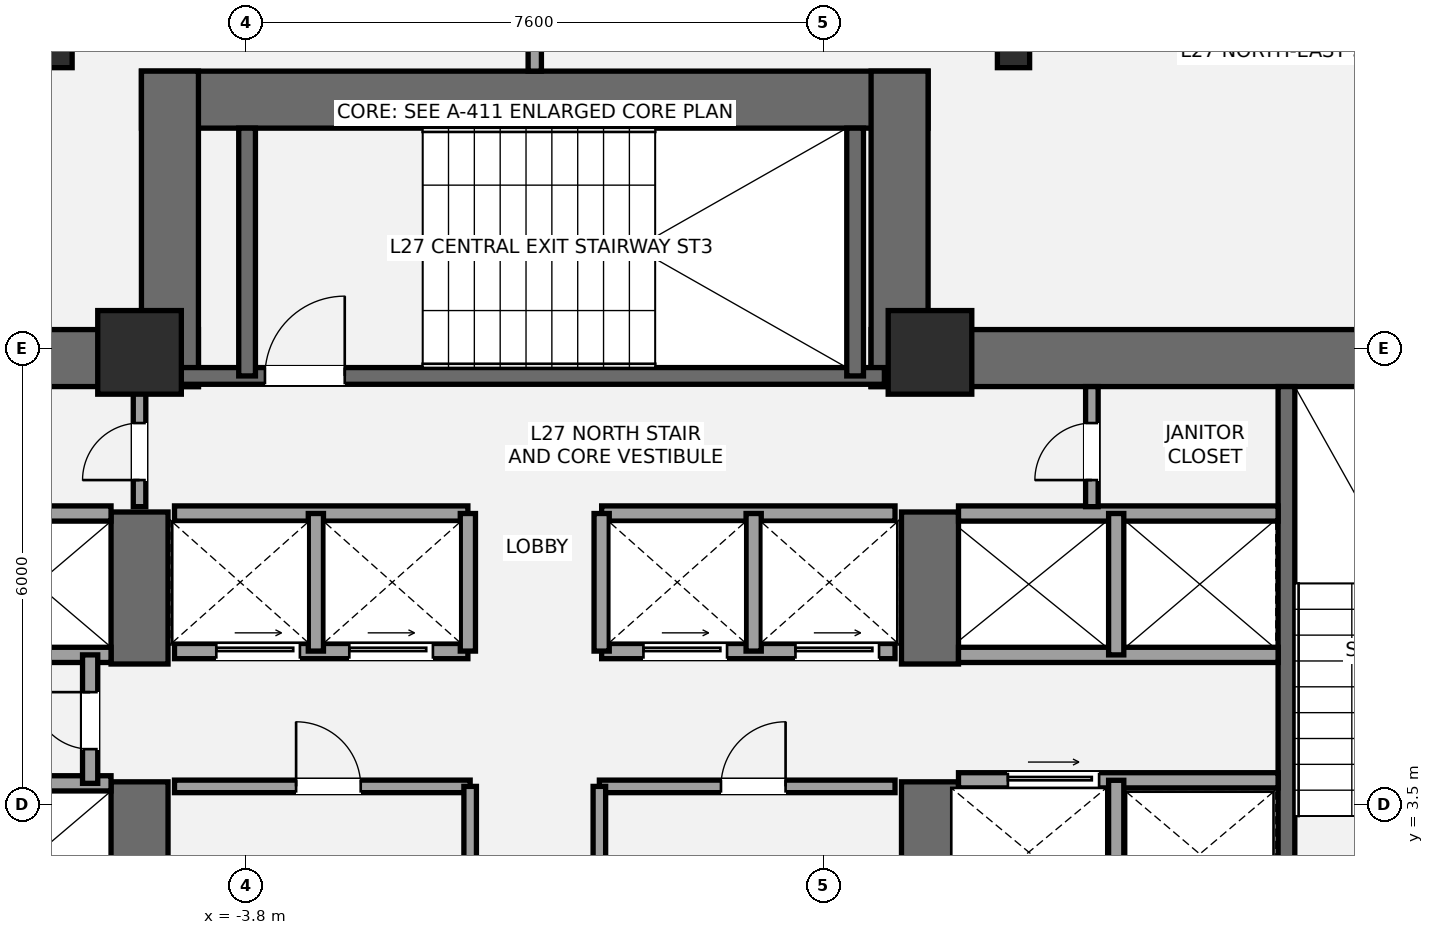
"""IFC4 building model, lengths in metres.
Left out: names, types, materials, properties, quantities, classifications, styles, units other than length and angle.
Written with IfcOpenShell. Run it as: python <this file> out.ifc"""

import sys

from ifc_helpers import new_model, si_unit, direction, frame, frame_2d, origin, origin_2d, place, context, subcontext, project, spatial, rectangle, i_section, extrude, element, fill, save


model = new_model("IFC4")
c1 = context("Model", 3, precision=1e-05, world=origin(), true_north=direction((0.0, 1.0)))
c2 = subcontext(c1, "Body", "Model", "MODEL_VIEW")
j1 = project(units=[si_unit("LENGTHUNIT", "METRE"), si_unit("PLANEANGLEUNIT", "RADIAN")], contexts=[c1])
p1 = place(None, origin())
s1 = spatial("IfcSite", under=j1, at=p1, CompositionType="ELEMENT")
p2 = place(p1, origin())
s2 = spatial("IfcBuilding", under=s1, at=p2, CompositionType="ELEMENT")
p3 = place(p2, frame((0.0, 0.0, 103.6)))
s3 = spatial("IfcBuildingStorey", under=s2, at=p3, CompositionType="ELEMENT", Elevation=103.6)
p4 = place(p3, frame((-13.9, 9.375, 0.0), z_axis=(0.0, 0.0, 1.0), x_axis=(1.0, 0.0, 0.0)))
e1 = element("IfcWall", 1, at=p4, inside=s3, PredefinedType="SHEAR", context=c2, shape_type="SweptSolid", body=[
    extrude(rectangle(XDim=9.475, YDim=0.75, at=frame_2d((4.737, 0.0))), origin(), (0.0, 0.0, 1.0), 3.5),
])
p5 = place(p3, frame((-5.2, 1.1, 0.0), z_axis=(0.0, 0.0, 1.0), x_axis=(0.0, 1.0, 0.0)))
e2 = element("IfcWall", 2, at=p5, inside=s3, PredefinedType="SHEAR", context=c2, shape_type="SweptSolid", body=[
    extrude(rectangle(XDim=2.7, YDim=0.75, at=frame_2d((1.35, 0.0))), origin(), (0.0, 0.0, 1.0), 3.5),
])
p6 = place(p3, frame((-5.2, 5.35, 0.0), z_axis=(0.0, 0.0, 1.0), x_axis=(0.0, 1.0, 0.0)))
e3 = element("IfcWall", 3, at=p6, inside=s3, PredefinedType="SHEAR", context=c2, shape_type="SweptSolid", body=[
    extrude(rectangle(XDim=2.0, YDim=0.75, at=frame_2d((1.0, 0.0))), origin(), (0.0, 0.0, 1.0), 3.5),
])
p7 = place(p3, frame((4.425, 9.375, 0.0), z_axis=(0.0, 0.0, 1.0), x_axis=(1.0, 0.0, 0.0)))
e4 = element("IfcWall", 4, at=p7, inside=s3, PredefinedType="SHEAR", context=c2, shape_type="SweptSolid", body=[
    extrude(rectangle(XDim=9.475, YDim=0.75, at=frame_2d((4.737, 0.0))), origin(), (0.0, 0.0, 1.0), 3.5),
])
p8 = place(p3, frame((5.2, 1.1, 0.0), z_axis=(0.0, 0.0, 1.0), x_axis=(0.0, 1.0, 0.0)))
e5 = element("IfcWall", 5, at=p8, inside=s3, PredefinedType="SHEAR", context=c2, shape_type="SweptSolid", body=[
    extrude(rectangle(XDim=2.7, YDim=0.75, at=frame_2d((1.35, 0.0))), origin(), (0.0, 0.0, 1.0), 3.5),
])
p9 = place(p3, frame((5.2, 5.35, 0.0), z_axis=(0.0, 0.0, 1.0), x_axis=(0.0, 1.0, 0.0)))
e6 = element("IfcWall", 6, at=p9, inside=s3, PredefinedType="SHEAR", context=c2, shape_type="SweptSolid", body=[
    extrude(rectangle(XDim=2.0, YDim=0.75, at=frame_2d((1.0, 0.0))), origin(), (0.0, 0.0, 1.0), 3.5),
])
p10 = place(p3, frame((9.89, 1.85, 0.0), z_axis=(0.0, 0.0, 1.0), x_axis=(0.0, 1.0, 0.0)))
e7 = element("IfcWall", 7, at=p10, inside=s3, PredefinedType="SHEAR", context=c2, shape_type="SweptSolid", body=[
    extrude(rectangle(XDim=7.15, YDim=0.22, at=frame_2d((3.575, 0.0))), origin(), (0.0, 0.0, 1.0), 3.5),
])
p11 = place(p3, frame((-5.175, 12.775, 0.0), z_axis=(0.0, 0.0, 1.0), x_axis=(1.0, 0.0, 0.0)))
e8 = element("IfcWall", 8, at=p11, inside=s3, PredefinedType="SHEAR", context=c2, shape_type="SweptSolid", body=[
    extrude(rectangle(XDim=10.35, YDim=0.75, at=frame_2d((5.175, 0.0))), origin(), (0.0, 0.0, 1.0), 3.5),
])
for number, where, z_axis, x_axis in (
    (9, (-4.8, 9.0, 0.0), (0.0, 0.0, 1.0), (0.0, 1.0, 0.0)),
    (10, (4.8, 9.0, 0.0), (0.0, 0.0, 1.0), (0.0, 1.0, 0.0)),
):
    element("IfcWall", number, at=place(p3, frame(where, z_axis=z_axis, x_axis=x_axis)), inside=s3, PredefinedType="SHEAR", context=c2, shape_type="SweptSolid", body=[
        extrude(rectangle(XDim=4.15, YDim=0.75, at=frame_2d((2.075, 0.0))), origin(), (0.0, 0.0, 1.0), 3.5),
    ])
p12 = place(p3, frame((-4.7, 9.14, 0.0), z_axis=(0.0, 0.0, 1.0), x_axis=(1.0, 0.0, 0.0)))
e11 = element("IfcWall", 11, at=p12, inside=s3, PredefinedType="SHEAR", context=c2, shape_type="SweptSolid", body=[
    extrude(rectangle(XDim=9.3, YDim=0.22, at=frame_2d((4.65, 0.0))), origin(), (0.0, 0.0, 1.0), 3.5),
])
p13 = place(p12, frame((1.15, 0.0, 0.0)))
e12 = element("IfcOpeningElement", 12, at=p13, cuts=e11, PredefinedType="OPENING", context=c2, shape_type="SweptSolid", body=[
    extrude(rectangle(XDim=1.05, YDim=2.15, at=frame_2d((0.525, 1.075))), frame((0.0, 0.12, 0.0), z_axis=(0.0, -1.0, 0.0), x_axis=(1.0, 0.0, 0.0)), (0.0, 0.0, 1.0), 0.24),
])
for number, where, z_axis, x_axis in (
    (13, (-3.785, 9.14, 0.0), (0.0, 0.0, 1.0), (0.0, 1.0, 0.0)),
    (14, (4.215, 9.14, 0.0), (0.0, 0.0, 1.0), (0.0, 1.0, 0.0)),
):
    element("IfcWall", number, at=place(p3, frame(where, z_axis=z_axis, x_axis=x_axis)), inside=s3, PredefinedType="SHEAR", context=c2, shape_type="SweptSolid", body=[
        extrude(rectangle(XDim=3.26, YDim=0.22, at=frame_2d((1.63, 0.0))), origin(), (0.0, 0.0, 1.0), 3.5),
    ])
for number, where, z_axis, x_axis in (
    (15, (-5.2, 9.45, 0.0), (0.0, 0.0, 1.0), (1.0, 0.0, 0.0)),
    (16, (5.2, 9.45, 0.0), (0.0, 0.0, 1.0), (1.0, 0.0, 0.0)),
):
    element("IfcColumn", number, at=place(p3, frame(where, z_axis=z_axis, x_axis=x_axis)), inside=s3, PredefinedType="COLUMN", context=c2, shape_type="SweptSolid", body=[
        extrude(rectangle(XDim=1.1, YDim=1.1, at=origin_2d()), origin(), (0.0, 0.0, 1.0), 3.5),
    ])
for number, where, z_axis, x_axis in (
    (17, (6.299, 13.433, 0.0), (0.0, 0.0, 1.0), (1.0, 0.0, 0.0)),
    (18, (-6.299, 13.433, 0.0), (0.0, 0.0, 1.0), (1.0, 0.0, 0.0)),
):
    element("IfcColumn", number, at=place(p3, frame(where, z_axis=z_axis, x_axis=x_axis)), inside=s3, PredefinedType="COLUMN", context=c2, shape_type="SweptSolid", body=[
        extrude(i_section(OverallWidth=0.424, OverallDepth=0.474, WebThickness=0.048, FlangeThickness=0.077, at=origin_2d()), origin(), (0.0, 0.0, 1.0), 3.5),
    ])
for number, where, z_axis, x_axis in (
    (19, (-9.78, 3.78, 0.0), (0.0, 0.0, 1.0), (1.0, 0.0, 0.0)),
    (20, (-9.78, 5.47, 0.0), (0.0, 0.0, 1.0), (1.0, 0.0, 0.0)),
    (21, (-9.78, 7.33, 0.0), (0.0, 0.0, 1.0), (1.0, 0.0, 0.0)),
):
    element("IfcWall", number, at=place(p3, frame(where, z_axis=z_axis, x_axis=x_axis)), inside=s3, PredefinedType="SOLIDWALL", context=c2, shape_type="SweptSolid", body=[
        extrude(rectangle(XDim=4.205, YDim=0.2, at=frame_2d((2.103, 0.0))), origin(), (0.0, 0.0, 1.0), 3.31),
    ])
p14 = place(p3, frame((-5.85, 3.78, 0.0), z_axis=(0.0, 0.0, 1.0), x_axis=(0.0, 1.0, 0.0)))
e22 = element("IfcWall", 22, at=p14, inside=s3, PredefinedType="SOLIDWALL", context=c2, shape_type="SweptSolid", body=[
    extrude(rectangle(XDim=1.69, YDim=0.2, at=frame_2d((0.845, 0.0))), origin(), (0.0, 0.0, 1.0), 3.31),
])
p15 = place(p14, frame((0.45, 0.0, 0.0)))
e23 = element("IfcOpeningElement", 23, at=p15, cuts=e22, PredefinedType="OPENING", context=c2, shape_type="SweptSolid", body=[
    extrude(rectangle(XDim=0.75, YDim=2.1, at=frame_2d((0.375, 1.05))), frame((0.0, 0.11, 0.0), z_axis=(0.0, -1.0, 0.0), x_axis=(1.0, 0.0, 0.0)), (0.0, 0.0, 1.0), 0.22),
])
p16 = place(p3, frame((5.575, 3.82, 0.0), z_axis=(0.0, 0.0, 1.0), x_axis=(1.0, 0.0, 0.0)))
e24 = element("IfcWall", 24, at=p16, inside=s3, PredefinedType="SOLIDWALL", context=c2, shape_type="SweptSolid", body=[
    extrude(rectangle(XDim=4.205, YDim=0.2, at=frame_2d((2.103, 0.0))), origin(), (0.0, 0.0, 1.0), 3.31),
])
p17 = place(p16, frame((0.65, 0.0, 0.0)))
e25 = element("IfcOpeningElement", 25, at=p17, cuts=e24, PredefinedType="OPENING", context=c2, shape_type="SweptSolid", body=[
    extrude(rectangle(XDim=1.2, YDim=2.2, at=frame_2d((0.6, 1.1))), frame((0.0, 0.11, 0.0), z_axis=(0.0, -1.0, 0.0), x_axis=(1.0, 0.0, 0.0)), (0.0, 0.0, 1.0), 0.22),
])
p18 = place(p3, frame((7.65, 1.85, 0.0), z_axis=(0.0, 0.0, 1.0), x_axis=(0.0, 1.0, 0.0)))
e26 = element("IfcWall", 26, at=p18, inside=s3, PredefinedType="SOLIDWALL", context=c2, shape_type="SweptSolid", body=[
    extrude(rectangle(XDim=1.97, YDim=0.2, at=frame_2d((0.985, 0.0))), origin(), (0.0, 0.0, 1.0), 3.31),
])
for number, where, z_axis, x_axis in (
    (27, (5.575, 5.47, 0.0), (0.0, 0.0, 1.0), (1.0, 0.0, 0.0)),
    (28, (5.575, 7.33, 0.0), (0.0, 0.0, 1.0), (1.0, 0.0, 0.0)),
):
    element("IfcWall", number, at=place(p3, frame(where, z_axis=z_axis, x_axis=x_axis)), inside=s3, PredefinedType="SOLIDWALL", context=c2, shape_type="SweptSolid", body=[
        extrude(rectangle(XDim=4.205, YDim=0.2, at=frame_2d((2.103, 0.0))), origin(), (0.0, 0.0, 1.0), 3.31),
    ])
p19 = place(p3, frame((7.65, 5.47, 0.0), z_axis=(0.0, 0.0, 1.0), x_axis=(0.0, 1.0, 0.0)))
e29 = element("IfcWall", 29, at=p19, inside=s3, PredefinedType="SOLIDWALL", context=c2, shape_type="SweptSolid", body=[
    extrude(rectangle(XDim=1.86, YDim=0.2, at=frame_2d((0.93, 0.0))), origin(), (0.0, 0.0, 1.0), 3.31),
])
p20 = place(p3, frame((-4.74, 3.74, 0.0), z_axis=(0.0, 0.0, 1.0), x_axis=(1.0, 0.0, 0.0)))
e30 = element("IfcWall", 30, at=p20, inside=s3, PredefinedType="PARTITIONING", context=c2, shape_type="SweptSolid", body=[
    extrude(rectangle(XDim=3.89, YDim=0.165, at=frame_2d((1.945, 0.0))), origin(), (0.0, 0.0, 1.0), 3.31),
])
p21 = place(p20, frame((1.6, 0.0, 0.0)))
e31 = element("IfcOpeningElement", 31, at=p21, cuts=e30, PredefinedType="OPENING", context=c2, shape_type="SweptSolid", body=[
    extrude(rectangle(XDim=0.85, YDim=2.1, at=frame_2d((0.425, 1.05))), frame((0.0, 0.093, 0.0), z_axis=(0.0, -1.0, 0.0), x_axis=(1.0, 0.0, 0.0)), (0.0, 0.0, 1.0), 0.185),
])
p22 = place(p3, frame((-0.85, 1.92, 0.0), z_axis=(0.0, 0.0, 1.0), x_axis=(0.0, 1.0, 0.0)))
e32 = element("IfcWall", 32, at=p22, inside=s3, PredefinedType="PARTITIONING", context=c2, shape_type="SweptSolid", body=[
    extrude(rectangle(XDim=1.82, YDim=0.165, at=frame_2d((0.91, 0.0))), origin(), (0.0, 0.0, 1.0), 3.31),
])
p23 = place(p3, frame((0.85, 3.74, 0.0), z_axis=(0.0, 0.0, 1.0), x_axis=(1.0, 0.0, 0.0)))
e33 = element("IfcWall", 33, at=p23, inside=s3, PredefinedType="PARTITIONING", context=c2, shape_type="SweptSolid", body=[
    extrude(rectangle(XDim=3.89, YDim=0.165, at=frame_2d((1.945, 0.0))), origin(), (0.0, 0.0, 1.0), 3.31),
])
p24 = place(p23, frame((1.6, 0.0, 0.0)))
e34 = element("IfcOpeningElement", 34, at=p24, cuts=e33, PredefinedType="OPENING", context=c2, shape_type="SweptSolid", body=[
    extrude(rectangle(XDim=0.85, YDim=2.1, at=frame_2d((0.425, 1.05))), frame((0.0, 0.093, 0.0), z_axis=(0.0, -1.0, 0.0), x_axis=(1.0, 0.0, 0.0)), (0.0, 0.0, 1.0), 0.185),
])
p25 = place(p3, frame((0.85, 1.92, 0.0), z_axis=(0.0, 0.0, 1.0), x_axis=(0.0, 1.0, 0.0)))
e35 = element("IfcWall", 35, at=p25, inside=s3, PredefinedType="PARTITIONING", context=c2, shape_type="SweptSolid", body=[
    extrude(rectangle(XDim=1.82, YDim=0.165, at=frame_2d((0.91, 0.0))), origin(), (0.0, 0.0, 1.0), 3.31),
])
p26 = place(p3, frame((-4.74, 5.52, 0.0), z_axis=(0.0, 0.0, 1.0), x_axis=(1.0, 0.0, 0.0)))
e36 = element("IfcWall", 36, at=p26, inside=s3, PredefinedType="SOLIDWALL", context=c2, shape_type="SweptSolid", body=[
    extrude(rectangle(XDim=3.86, YDim=0.2, at=frame_2d((1.93, 0.0))), origin(), (0.0, 0.0, 1.0), 3.31),
])
p27 = place(p26, frame((0.55, 0.0, 0.0)))
e37 = element("IfcOpeningElement", 37, at=p27, cuts=e36, PredefinedType="OPENING", context=c2, shape_type="SweptSolid", body=[
    extrude(rectangle(XDim=1.1, YDim=2.2, at=frame_2d((0.55, 1.1))), frame((0.0, 0.11, 0.0), z_axis=(0.0, -1.0, 0.0), x_axis=(1.0, 0.0, 0.0)), (0.0, 0.0, 1.0), 0.22),
])
p28 = place(p26, frame((2.3, 0.0, 0.0)))
e38 = element("IfcOpeningElement", 38, at=p28, cuts=e36, PredefinedType="OPENING", context=c2, shape_type="SweptSolid", body=[
    extrude(rectangle(XDim=1.1, YDim=2.2, at=frame_2d((0.55, 1.1))), frame((0.0, 0.11, 0.0), z_axis=(0.0, -1.0, 0.0), x_axis=(1.0, 0.0, 0.0)), (0.0, 0.0, 1.0), 0.22),
])
p29 = place(p3, frame((0.88, 5.52, 0.0), z_axis=(0.0, 0.0, 1.0), x_axis=(1.0, 0.0, 0.0)))
e39 = element("IfcWall", 39, at=p29, inside=s3, PredefinedType="SOLIDWALL", context=c2, shape_type="SweptSolid", body=[
    extrude(rectangle(XDim=3.86, YDim=0.2, at=frame_2d((1.93, 0.0))), origin(), (0.0, 0.0, 1.0), 3.31),
])
p30 = place(p29, frame((0.55, 0.0, 0.0)))
e40 = element("IfcOpeningElement", 40, at=p30, cuts=e39, PredefinedType="OPENING", context=c2, shape_type="SweptSolid", body=[
    extrude(rectangle(XDim=1.1, YDim=2.2, at=frame_2d((0.55, 1.1))), frame((0.0, 0.11, 0.0), z_axis=(0.0, -1.0, 0.0), x_axis=(1.0, 0.0, 0.0)), (0.0, 0.0, 1.0), 0.22),
])
p31 = place(p29, frame((2.55, 0.0, 0.0)))
e41 = element("IfcOpeningElement", 41, at=p31, cuts=e39, PredefinedType="OPENING", context=c2, shape_type="SweptSolid", body=[
    extrude(rectangle(XDim=1.1, YDim=2.2, at=frame_2d((0.55, 1.1))), frame((0.0, 0.11, 0.0), z_axis=(0.0, -1.0, 0.0), x_axis=(1.0, 0.0, 0.0)), (0.0, 0.0, 1.0), 0.22),
])
for number, where, z_axis, x_axis in (
    (42, (-4.74, 7.33, 0.0), (0.0, 0.0, 1.0), (1.0, 0.0, 0.0)),
    (43, (0.88, 7.33, 0.0), (0.0, 0.0, 1.0), (1.0, 0.0, 0.0)),
):
    element("IfcWall", number, at=place(p3, frame(where, z_axis=z_axis, x_axis=x_axis)), inside=s3, PredefinedType="SOLIDWALL", context=c2, shape_type="SweptSolid", body=[
        extrude(rectangle(XDim=3.86, YDim=0.2, at=frame_2d((1.93, 0.0))), origin(), (0.0, 0.0, 1.0), 3.31),
    ])
for number, where, z_axis, x_axis in (
    (44, (-2.88, 5.52, 0.0), (0.0, 0.0, 1.0), (0.0, 1.0, 0.0)),
    (45, (2.88, 5.52, 0.0), (0.0, 0.0, 1.0), (0.0, 1.0, 0.0)),
    (46, (-0.88, 5.52, 0.0), (0.0, 0.0, 1.0), (0.0, 1.0, 0.0)),
    (47, (0.88, 5.52, 0.0), (0.0, 0.0, 1.0), (0.0, 1.0, 0.0)),
):
    element("IfcWall", number, at=place(p3, frame(where, z_axis=z_axis, x_axis=x_axis)), inside=s3, PredefinedType="SOLIDWALL", context=c2, shape_type="SweptSolid", body=[
        extrude(rectangle(XDim=1.81, YDim=0.2, at=frame_2d((0.905, 0.0))), origin(), (0.0, 0.0, 1.0), 3.31),
    ])
p32 = place(p3, frame((-5.2, 7.42, 0.0), z_axis=(0.0, 0.0, 1.0), x_axis=(0.0, 1.0, 0.0)))
e48 = element("IfcWall", 48, at=p32, inside=s3, PredefinedType="PARTITIONING", context=c2, shape_type="SweptSolid", body=[
    extrude(rectangle(XDim=1.58, YDim=0.165, at=frame_2d((0.79, 0.0))), origin(), (0.0, 0.0, 1.0), 3.31),
])
p33 = place(p32, frame((0.35, 0.0, 0.0)))
e49 = element("IfcOpeningElement", 49, at=p33, cuts=e48, PredefinedType="OPENING", context=c2, shape_type="SweptSolid", body=[
    extrude(rectangle(XDim=0.75, YDim=2.1, at=frame_2d((0.375, 1.05))), frame((0.0, 0.093, 0.0), z_axis=(0.0, -1.0, 0.0), x_axis=(1.0, 0.0, 0.0)), (0.0, 0.0, 1.0), 0.185),
])
p34 = place(p3, frame((7.33, 7.42, 0.0), z_axis=(0.0, 0.0, 1.0), x_axis=(0.0, 1.0, 0.0)))
e50 = element("IfcWall", 50, at=p34, inside=s3, PredefinedType="PARTITIONING", context=c2, shape_type="SweptSolid", body=[
    extrude(rectangle(XDim=1.58, YDim=0.165, at=frame_2d((0.79, 0.0))), origin(), (0.0, 0.0, 1.0), 3.31),
])
p35 = place(p34, frame((0.35, 0.0, 0.0)))
e51 = element("IfcOpeningElement", 51, at=p35, cuts=e50, PredefinedType="OPENING", context=c2, shape_type="SweptSolid", body=[
    extrude(rectangle(XDim=0.75, YDim=2.1, at=frame_2d((0.375, 1.05))), frame((0.0, 0.093, 0.0), z_axis=(0.0, -1.0, 0.0), x_axis=(1.0, 0.0, 0.0)), (0.0, 0.0, 1.0), 0.185),
])
p36 = place(p3, frame((0.0, 13.15, 0.0), z_axis=(0.0, 0.0, 1.0), x_axis=(0.0, 1.0, 0.0)))
e52 = element("IfcWall", 52, at=p36, inside=s3, PredefinedType="PARTITIONING", context=c2, shape_type="SweptSolid", body=[
    extrude(rectangle(XDim=5.19, YDim=0.175, at=frame_2d((2.595, 0.0))), origin(), (0.0, 0.0, 1.0), 3.31),
])
p37 = place(p13, origin())
e53 = element("IfcDoor", 53, at=p37, inside=s3, OperationType="SINGLE_SWING_RIGHT", PredefinedType="DOOR", context=c2, shape_type="SweptSolid", body=[
    extrude(rectangle(XDim=1.05, YDim=2.15, at=frame_2d((0.525, 1.075))), frame((0.0, 0.025, 0.0), z_axis=(0.0, -1.0, 0.0), x_axis=(1.0, 0.0, 0.0)), (0.0, 0.0, 1.0), 0.05),
])
fill(e12, e53)
p38 = place(p15, origin())
e54 = element("IfcDoor", 54, at=p38, inside=s3, OperationType="SINGLE_SWING_RIGHT", PredefinedType="DOOR", context=c2, shape_type="SweptSolid", body=[
    extrude(rectangle(XDim=0.75, YDim=2.1, at=frame_2d((0.375, 1.05))), frame((0.0, 0.025, 0.0), z_axis=(0.0, -1.0, 0.0), x_axis=(1.0, 0.0, 0.0)), (0.0, 0.0, 1.0), 0.05),
])
fill(e23, e54)
p39 = place(p17, origin())
e55 = element("IfcDoor", 55, at=p39, inside=s3, OperationType="SLIDING_TO_RIGHT", PredefinedType="DOOR", context=c2, shape_type="SweptSolid", body=[
    extrude(rectangle(XDim=1.2, YDim=2.2, at=frame_2d((0.6, 1.1))), frame((0.0, 0.025, 0.0), z_axis=(0.0, -1.0, 0.0), x_axis=(1.0, 0.0, 0.0)), (0.0, 0.0, 1.0), 0.05),
])
fill(e25, e55)
p40 = place(p21, origin())
e56 = element("IfcDoor", 56, at=p40, inside=s3, OperationType="SINGLE_SWING_LEFT", PredefinedType="DOOR", context=c2, shape_type="SweptSolid", body=[
    extrude(rectangle(XDim=0.85, YDim=2.1, at=frame_2d((0.425, 1.05))), frame((0.0, 0.025, 0.0), z_axis=(0.0, -1.0, 0.0), x_axis=(1.0, 0.0, 0.0)), (0.0, 0.0, 1.0), 0.05),
])
fill(e31, e56)
p41 = place(p24, origin())
e57 = element("IfcDoor", 57, at=p41, inside=s3, OperationType="SINGLE_SWING_RIGHT", PredefinedType="DOOR", context=c2, shape_type="SweptSolid", body=[
    extrude(rectangle(XDim=0.85, YDim=2.1, at=frame_2d((0.425, 1.05))), frame((0.0, 0.025, 0.0), z_axis=(0.0, -1.0, 0.0), x_axis=(1.0, 0.0, 0.0)), (0.0, 0.0, 1.0), 0.05),
])
fill(e34, e57)
p42 = place(p27, origin())
e58 = element("IfcDoor", 58, at=p42, inside=s3, OperationType="SLIDING_TO_LEFT", PredefinedType="DOOR", context=c2, shape_type="SweptSolid", body=[
    extrude(rectangle(XDim=1.1, YDim=2.2, at=frame_2d((0.55, 1.1))), frame((0.0, 0.025, 0.0), z_axis=(0.0, -1.0, 0.0), x_axis=(1.0, 0.0, 0.0)), (0.0, 0.0, 1.0), 0.05),
])
fill(e37, e58)
p43 = place(p28, origin())
e59 = element("IfcDoor", 59, at=p43, inside=s3, OperationType="SLIDING_TO_LEFT", PredefinedType="DOOR", context=c2, shape_type="SweptSolid", body=[
    extrude(rectangle(XDim=1.1, YDim=2.2, at=frame_2d((0.55, 1.1))), frame((0.0, 0.025, 0.0), z_axis=(0.0, -1.0, 0.0), x_axis=(1.0, 0.0, 0.0)), (0.0, 0.0, 1.0), 0.05),
])
fill(e38, e59)
p44 = place(p30, origin())
e60 = element("IfcDoor", 60, at=p44, inside=s3, OperationType="SLIDING_TO_LEFT", PredefinedType="DOOR", context=c2, shape_type="SweptSolid", body=[
    extrude(rectangle(XDim=1.1, YDim=2.2, at=frame_2d((0.55, 1.1))), frame((0.0, 0.025, 0.0), z_axis=(0.0, -1.0, 0.0), x_axis=(1.0, 0.0, 0.0)), (0.0, 0.0, 1.0), 0.05),
])
fill(e40, e60)
p45 = place(p31, origin())
e61 = element("IfcDoor", 61, at=p45, inside=s3, OperationType="SLIDING_TO_LEFT", PredefinedType="DOOR", context=c2, shape_type="SweptSolid", body=[
    extrude(rectangle(XDim=1.1, YDim=2.2, at=frame_2d((0.55, 1.1))), frame((0.0, 0.025, 0.0), z_axis=(0.0, -1.0, 0.0), x_axis=(1.0, 0.0, 0.0)), (0.0, 0.0, 1.0), 0.05),
])
fill(e41, e61)
p46 = place(p33, origin())
e62 = element("IfcDoor", 62, at=p46, inside=s3, OperationType="SINGLE_SWING_LEFT", PredefinedType="DOOR", context=c2, shape_type="SweptSolid", body=[
    extrude(rectangle(XDim=0.75, YDim=2.1, at=frame_2d((0.375, 1.05))), frame((0.0, 0.025, 0.0), z_axis=(0.0, -1.0, 0.0), x_axis=(1.0, 0.0, 0.0)), (0.0, 0.0, 1.0), 0.05),
])
fill(e49, e62)
p47 = place(p35, origin())
e63 = element("IfcDoor", 63, at=p47, inside=s3, OperationType="SINGLE_SWING_LEFT", PredefinedType="DOOR", context=c2, shape_type="SweptSolid", body=[
    extrude(rectangle(XDim=0.75, YDim=2.1, at=frame_2d((0.375, 1.05))), frame((0.0, 0.025, 0.0), z_axis=(0.0, -1.0, 0.0), x_axis=(1.0, 0.0, 0.0)), (0.0, 0.0, 1.0), 0.05),
])
fill(e51, e63)
save(model, sys.argv[1])
